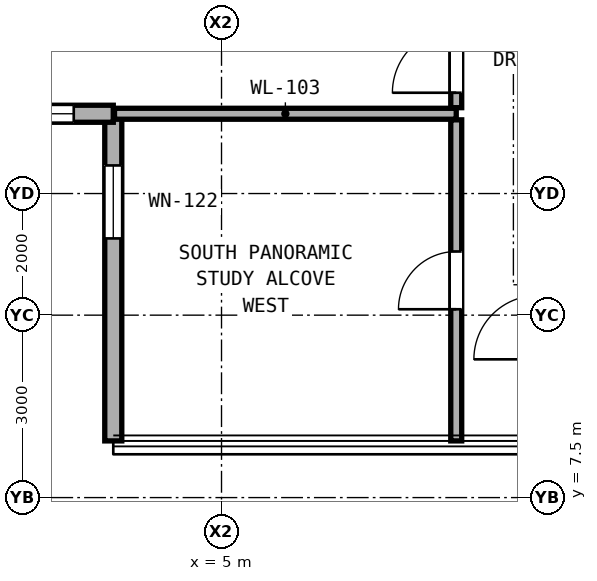
"""IFC4 building model, lengths in metres.
Left out: names, types, materials, properties, quantities, classifications, styles, units other than length and angle.
Written with IfcOpenShell. Run it as: python <this file> out.ifc"""

import sys

from ifc_helpers import new_model, si_unit, direction, frame, frame_2d, origin, place, context, subcontext, project, spatial, rectangle, extrude, element, fill, save


model = new_model("IFC4")
c1 = context("Model", 3, precision=1e-05, world=origin(), true_north=direction((0.0, 1.0)))
c2 = subcontext(c1, "Body", "Model", "MODEL_VIEW")
j1 = project(units=[si_unit("LENGTHUNIT", "METRE"), si_unit("PLANEANGLEUNIT", "RADIAN")], contexts=[c1])
p1 = place(None, origin())
s1 = spatial("IfcSite", under=j1, at=p1, CompositionType="ELEMENT")
p2 = place(p1, origin())
s2 = spatial("IfcBuilding", under=s1, at=p2, CompositionType="ELEMENT")
p3 = place(p2, frame((0.0, 0.0, 42.2)))
s3 = spatial("IfcBuildingStorey", under=s2, at=p3, CompositionType="ELEMENT", Elevation=42.2)
p4 = place(p3, frame((3.22, 13.812, 0.0), z_axis=(0.0, 0.0, 1.0), x_axis=(0.0, -1.0, 0.0)))
e1 = element("IfcWall", 1, at=p4, inside=s3, PredefinedType="SOLIDWALL", context=c2, shape_type="SweptSolid", body=[
    extrude(rectangle(XDim=5.38, YDim=0.28, at=frame_2d((2.69, 0.0))), origin(), (0.0, 0.0, 1.0), 3.04),
])
p5 = place(p4, frame((0.85, 0.0, 0.79)))
e2 = element("IfcOpeningElement", 2, at=p5, cuts=e1, PredefinedType="OPENING", context=c2, shape_type="SweptSolid", body=[
    extrude(rectangle(XDim=1.2, YDim=2.1, at=frame_2d((0.6, 1.05))), frame((0.0, 0.15, 0.0), z_axis=(0.0, -1.0, 0.0), x_axis=(1.0, 0.0, 0.0)), (0.0, 0.0, 1.0), 0.3),
])
p6 = place(p3, frame((-2.16, 13.812, 0.0), z_axis=(0.0, 0.0, 1.0), x_axis=(1.0, 0.0, 0.0)))
e3 = element("IfcWall", 3, at=p6, inside=s3, PredefinedType="SOLIDWALL", context=c2, shape_type="SweptSolid", body=[
    extrude(rectangle(XDim=5.38, YDim=0.28, at=frame_2d((2.69, 0.0))), origin(), (0.0, 0.0, 1.0), 3.04),
])
p7 = place(p6, frame((3.63, 0.0, 0.85)))
e4 = element("IfcOpeningElement", 4, at=p7, cuts=e3, PredefinedType="OPENING", context=c2, shape_type="SweptSolid", body=[
    extrude(rectangle(XDim=1.1, YDim=2.0, at=frame_2d((0.55, 1.0))), frame((0.0, 0.15, 0.0), z_axis=(0.0, -1.0, 0.0), x_axis=(1.0, 0.0, 0.0)), (0.0, 0.0, 1.0), 0.3),
])
p8 = place(p3, frame((3.24, 13.812, 0.0), z_axis=(0.0, 0.0, 1.0), x_axis=(1.0, 0.0, 0.0)))
e5 = element("IfcWall", 5, at=p8, inside=s3, PredefinedType="PARTITIONING", context=c2, shape_type="SweptSolid", body=[
    extrude(rectangle(XDim=5.62, YDim=0.18, at=frame_2d((2.81, 0.0))), origin(), (0.0, 0.0, 1.0), 3.06),
])
p9 = place(p3, frame((8.86, 8.432, 0.0), z_axis=(0.0, 0.0, 1.0), x_axis=(0.0, 1.0, 0.0)))
e6 = element("IfcWall", 6, at=p9, inside=s3, PredefinedType="PARTITIONING", context=c2, shape_type="SweptSolid", body=[
    extrude(rectangle(XDim=5.28, YDim=0.18, at=frame_2d((2.64, 0.0))), origin(), (0.0, 0.0, 1.0), 3.06),
])
p10 = place(p9, frame((2.165, 0.0, 0.0)))
e7 = element("IfcOpeningElement", 7, at=p10, cuts=e6, PredefinedType="OPENING", context=c2, shape_type="SweptSolid", body=[
    extrude(rectangle(XDim=0.95, YDim=2.15, at=frame_2d((0.475, 1.075))), frame((0.0, 0.1, 0.0), z_axis=(0.0, -1.0, 0.0), x_axis=(1.0, 0.0, 0.0)), (0.0, 0.0, 1.0), 0.2),
])
p11 = place(p3, frame((8.86, 13.912, 0.0), z_axis=(0.0, 0.0, 1.0), x_axis=(0.0, 1.0, 0.0)))
e8 = element("IfcWall", 8, at=p11, inside=s3, PredefinedType="PARTITIONING", context=c2, shape_type="SweptSolid", body=[
    extrude(rectangle(XDim=4.241, YDim=0.18, at=frame_2d((2.121, 0.0))), origin(), (0.0, 0.0, 1.0), 2.436),
])
p12 = place(p11, frame((0.246, 0.0, 0.0)))
e9 = element("IfcOpeningElement", 9, at=p12, cuts=e8, PredefinedType="OPENING", context=c2, shape_type="SweptSolid", body=[
    extrude(rectangle(XDim=1.05, YDim=2.2, at=frame_2d((0.525, 1.1))), frame((0.0, 0.1, 0.0), z_axis=(0.0, -1.0, 0.0), x_axis=(1.0, 0.0, 0.0)), (0.0, 0.0, 1.0), 0.2),
])
p13 = place(p5, origin())
e10 = element("IfcWindow", 10, at=p13, inside=s3, PartitioningType="SINGLE_PANEL", PredefinedType="WINDOW", context=c2, shape_type="SweptSolid", body=[
    extrude(rectangle(XDim=1.2, YDim=2.1, at=frame_2d((0.6, 1.05))), frame((0.0, 0.03, 0.0), z_axis=(0.0, -1.0, 0.0), x_axis=(1.0, 0.0, 0.0)), (0.0, 0.0, 1.0), 0.06),
])
fill(e2, e10)
p14 = place(p7, origin())
e11 = element("IfcWindow", 11, at=p14, inside=s3, PartitioningType="SINGLE_PANEL", PredefinedType="WINDOW", context=c2, shape_type="SweptSolid", body=[
    extrude(rectangle(XDim=1.1, YDim=2.0, at=frame_2d((0.55, 1.0))), frame((0.0, 0.03, 0.0), z_axis=(0.0, -1.0, 0.0), x_axis=(1.0, 0.0, 0.0)), (0.0, 0.0, 1.0), 0.06),
])
fill(e4, e11)
p15 = place(p12, origin())
e12 = element("IfcDoor", 12, at=p15, inside=s3, OperationType="SINGLE_SWING_LEFT", PredefinedType="DOOR", context=c2, shape_type="SweptSolid", body=[
    extrude(rectangle(XDim=1.05, YDim=2.2, at=frame_2d((0.525, 1.1))), frame((0.0, 0.025, 0.0), z_axis=(0.0, -1.0, 0.0), x_axis=(1.0, 0.0, 0.0)), (0.0, 0.0, 1.0), 0.05),
])
fill(e9, e12)
p16 = place(p10, origin())
e13 = element("IfcDoor", 13, at=p16, inside=s3, OperationType="SINGLE_SWING_LEFT", PredefinedType="DOOR", context=c2, shape_type="SweptSolid", body=[
    extrude(rectangle(XDim=0.95, YDim=2.15, at=frame_2d((0.475, 1.075))), frame((0.0, 0.025, 0.0), z_axis=(0.0, -1.0, 0.0), x_axis=(1.0, 0.0, 0.0)), (0.0, 0.0, 1.0), 0.05),
])
fill(e7, e13)
save(model, sys.argv[1])
